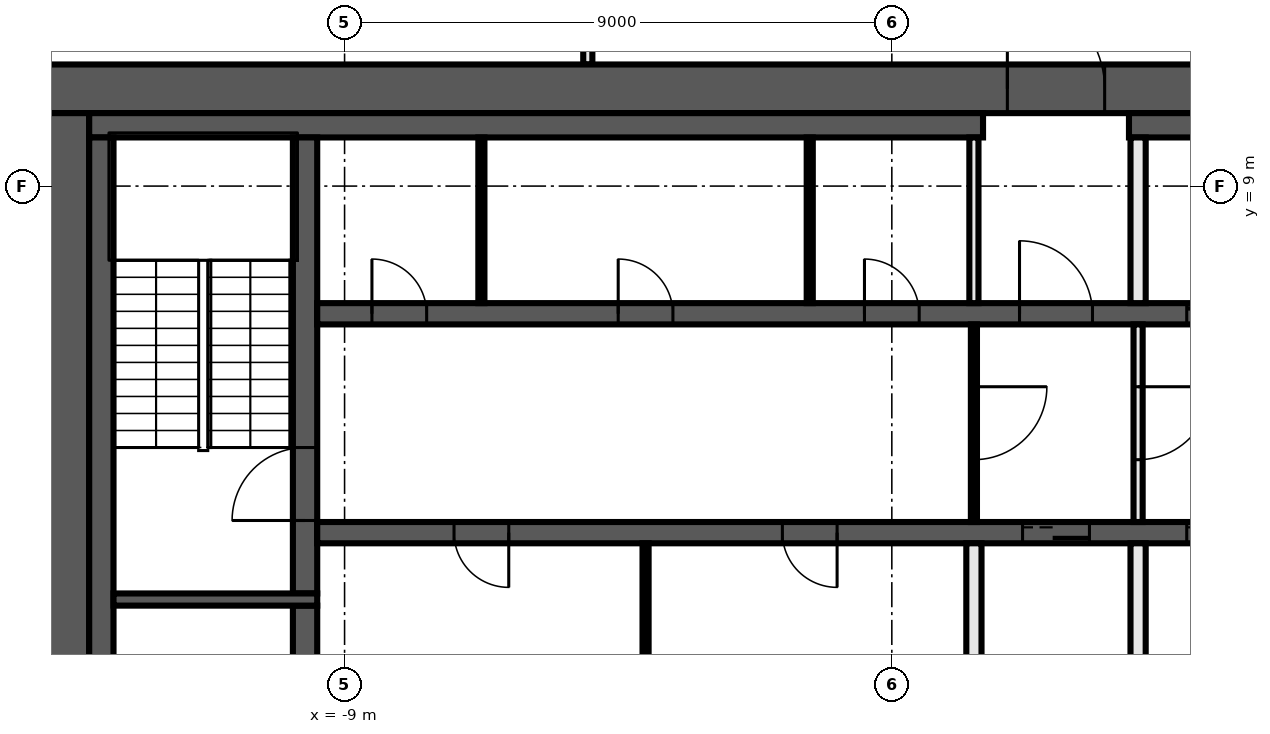
"""IFC4 building model, lengths in metres.
Left out: names, types, materials, properties, quantities, classifications, styles, units other than length and angle.
Written with IfcOpenShell. Run it as: python <this file> out.ifc"""

import sys

from ifc_helpers import new_model, si_unit, direction, frame, frame_2d, origin, place, context, subcontext, project, spatial, rectangle, extrude, element, fill, save


model = new_model("IFC4")
c1 = context("Model", 3, precision=1e-05, world=origin(), true_north=direction((0.0, 1.0)))
c2 = subcontext(c1, "Body", "Model", "MODEL_VIEW")
j1 = project(units=[si_unit("LENGTHUNIT", "METRE"), si_unit("PLANEANGLEUNIT", "RADIAN")], contexts=[c1])
p1 = place(None, origin())
s1 = spatial("IfcSite", under=j1, at=p1, CompositionType="ELEMENT")
p2 = place(p1, origin())
s2 = spatial("IfcBuilding", under=s1, at=p2, CompositionType="ELEMENT")
p3 = place(p2, frame((0.0, 0.0, 207.2)))
s3 = spatial("IfcBuildingStorey", under=s2, at=p3, CompositionType="ELEMENT", Elevation=207.2)
p4 = place(p3, frame((-5.0, 11.0, 0.0), z_axis=(0.0, 0.0, 1.0), x_axis=(0.0, 1.0, 0.0)))
e1 = element("IfcWall", 1, at=p4, inside=s3, PredefinedType="PARTITIONING", context=c2, shape_type="SweptSolid", body=[
    extrude(rectangle(XDim=3.125, YDim=0.15, at=frame_2d((1.562, 0.0))), origin(), (0.0, 0.0, 1.0), 3.82),
])
p5 = place(p3, frame((-14.0, 10.6, 0.0), z_axis=(0.0, 0.0, 1.0), x_axis=(1.0, 0.0, 0.0)))
e2 = element("IfcWall", 2, at=p5, inside=s3, PredefinedType="SHEAR", context=c2, shape_type="SweptSolid", body=[
    extrude(rectangle(XDim=28.0, YDim=0.8, at=frame_2d((14.0, 0.0))), origin(), (0.0, 0.0, 1.0), 3.82),
])
p6 = place(p5, frame((15.9, 0.0, 0.0)))
e3 = element("IfcOpeningElement", 3, at=p6, cuts=e2, PredefinedType="OPENING", context=c2, shape_type="SweptSolid", body=[
    extrude(rectangle(XDim=1.6, YDim=2.1, at=frame_2d((0.8, 1.05))), frame((0.0, 0.41, 0.0), z_axis=(0.0, -1.0, 0.0), x_axis=(1.0, 0.0, 0.0)), (0.0, 0.0, 1.0), 0.82),
])
p7 = place(p3, frame((-13.6, -10.2, 0.0), z_axis=(0.0, 0.0, 1.0), x_axis=(0.0, 1.0, 0.0)))
e4 = element("IfcWall", 4, at=p7, inside=s3, PredefinedType="SHEAR", context=c2, shape_type="SweptSolid", body=[
    extrude(rectangle(XDim=20.4, YDim=0.8, at=frame_2d((10.2, 0.0))), origin(), (0.0, 0.0, 1.0), 3.82),
])
p8 = place(p3, frame((-13.2, 10.0, 0.0), z_axis=(0.0, 0.0, 1.0), x_axis=(1.0, 0.0, 0.0)))
e5 = element("IfcWall", 5, at=p8, inside=s3, PredefinedType="SHEAR", context=c2, shape_type="SweptSolid", body=[
    extrude(rectangle(XDim=14.7, YDim=0.4, at=frame_2d((7.35, 0.0))), origin(), (0.0, 0.0, 1.0), 3.82),
])
p9 = place(p3, frame((3.9, 10.0, 0.0), z_axis=(0.0, 0.0, 1.0), x_axis=(1.0, 0.0, 0.0)))
e6 = element("IfcWall", 6, at=p9, inside=s3, PredefinedType="SHEAR", context=c2, shape_type="SweptSolid", body=[
    extrude(rectangle(XDim=9.3, YDim=0.4, at=frame_2d((4.65, 0.0))), origin(), (0.0, 0.0, 1.0), 3.82),
])
p10 = place(p3, frame((-13.0, -9.8, 0.0), z_axis=(0.0, 0.0, 1.0), x_axis=(0.0, 1.0, 0.0)))
e7 = element("IfcWall", 7, at=p10, inside=s3, PredefinedType="SHEAR", context=c2, shape_type="SweptSolid", body=[
    extrude(rectangle(XDim=19.6, YDim=0.4, at=frame_2d((9.8, 0.0))), origin(), (0.0, 0.0, 1.0), 3.82),
])
p11 = place(p3, frame((-9.65, -2.1, 0.0), z_axis=(0.0, 0.0, 1.0), x_axis=(0.0, 1.0, 0.0)))
e8 = element("IfcWall", 8, at=p11, inside=s3, PredefinedType="SHEAR", context=c2, shape_type="SweptSolid", body=[
    extrude(rectangle(XDim=4.2, YDim=0.4, at=frame_2d((2.1, 0.0))), origin(), (0.0, 0.0, 1.0), 3.82),
])
p12 = place(p3, frame((-9.65, 2.3, 0.0), z_axis=(0.0, 0.0, 1.0), x_axis=(0.0, 1.0, 0.0)))
e9 = element("IfcWall", 9, at=p12, inside=s3, PredefinedType="SHEAR", context=c2, shape_type="SweptSolid", body=[
    extrude(rectangle(XDim=7.5, YDim=0.4, at=frame_2d((3.75, 0.0))), origin(), (0.0, 0.0, 1.0), 3.82),
])
p13 = place(p12, frame((1.2, 0.0, 0.0)))
e10 = element("IfcOpeningElement", 10, at=p13, cuts=e9, PredefinedType="OPENING", context=c2, shape_type="SweptSolid", body=[
    extrude(rectangle(XDim=1.2, YDim=2.1, at=frame_2d((0.6, 1.05))), frame((0.0, 0.21, 0.0), z_axis=(0.0, -1.0, 0.0), x_axis=(1.0, 0.0, 0.0)), (0.0, 0.0, 1.0), 0.42),
])
p14 = place(p3, frame((-9.45, 2.2, 0.0), z_axis=(0.0, 0.0, 1.0), x_axis=(-1.0, 0.0, 0.0)))
e11 = element("IfcWall", 11, at=p14, inside=s3, PredefinedType="SHEAR", context=c2, shape_type="SweptSolid", body=[
    extrude(rectangle(XDim=3.35, YDim=0.2, at=frame_2d((1.675, 0.0))), origin(), (0.0, 0.0, 1.0), 3.82),
])
p15 = place(p3, frame((-9.45, 6.9, 0.0), z_axis=(0.0, 0.0, 1.0), x_axis=(1.0, 0.0, 0.0)))
e12 = element("IfcWall", 12, at=p15, inside=s3, PredefinedType="SHEAR", context=c2, shape_type="SweptSolid", body=[
    extrude(rectangle(XDim=18.9, YDim=0.35, at=frame_2d((9.45, 0.0))), origin(), (0.0, 0.0, 1.0), 3.82),
])
p16 = place(p15, frame((11.55, 0.0, 0.0)))
e13 = element("IfcOpeningElement", 13, at=p16, cuts=e12, PredefinedType="OPENING", context=c2, shape_type="SweptSolid", body=[
    extrude(rectangle(XDim=1.2, YDim=2.1, at=frame_2d((0.6, 1.05))), frame((0.0, 0.185, 0.0), z_axis=(0.0, -1.0, 0.0), x_axis=(1.0, 0.0, 0.0)), (0.0, 0.0, 1.0), 0.37),
])
p17 = place(p15, frame((14.3, 0.0, 0.0)))
e14 = element("IfcOpeningElement", 14, at=p17, cuts=e12, PredefinedType="OPENING", context=c2, shape_type="SweptSolid", body=[
    extrude(rectangle(XDim=1.1, YDim=2.1, at=frame_2d((0.55, 1.05))), frame((0.0, 0.185, 0.0), z_axis=(0.0, -1.0, 0.0), x_axis=(1.0, 0.0, 0.0)), (0.0, 0.0, 1.0), 0.37),
])
p18 = place(p15, frame((17.0, 0.0, 0.0)))
e15 = element("IfcOpeningElement", 15, at=p18, cuts=e12, PredefinedType="OPENING", context=c2, shape_type="SweptSolid", body=[
    extrude(rectangle(XDim=1.1, YDim=2.1, at=frame_2d((0.55, 1.05))), frame((0.0, 0.185, 0.0), z_axis=(0.0, -1.0, 0.0), x_axis=(1.0, 0.0, 0.0)), (0.0, 0.0, 1.0), 0.37),
])
p19 = place(p15, frame((0.9, 0.0, 0.0)))
e16 = element("IfcOpeningElement", 16, at=p19, cuts=e12, PredefinedType="OPENING", context=c2, shape_type="SweptSolid", body=[
    extrude(rectangle(XDim=0.9, YDim=2.1, at=frame_2d((0.45, 1.05))), frame((0.0, 0.185, 0.0), z_axis=(0.0, -1.0, 0.0), x_axis=(1.0, 0.0, 0.0)), (0.0, 0.0, 1.0), 0.37),
])
p20 = place(p15, frame((4.95, 0.0, 0.0)))
e17 = element("IfcOpeningElement", 17, at=p20, cuts=e12, PredefinedType="OPENING", context=c2, shape_type="SweptSolid", body=[
    extrude(rectangle(XDim=0.9, YDim=2.1, at=frame_2d((0.45, 1.05))), frame((0.0, 0.185, 0.0), z_axis=(0.0, -1.0, 0.0), x_axis=(1.0, 0.0, 0.0)), (0.0, 0.0, 1.0), 0.37),
])
p21 = place(p15, frame((9.0, 0.0, 0.0)))
e18 = element("IfcOpeningElement", 18, at=p21, cuts=e12, PredefinedType="OPENING", context=c2, shape_type="SweptSolid", body=[
    extrude(rectangle(XDim=0.9, YDim=2.1, at=frame_2d((0.45, 1.05))), frame((0.0, 0.185, 0.0), z_axis=(0.0, -1.0, 0.0), x_axis=(1.0, 0.0, 0.0)), (0.0, 0.0, 1.0), 0.37),
])
p22 = place(p3, frame((9.45, 3.3, 0.0), z_axis=(0.0, 0.0, 1.0), x_axis=(-1.0, 0.0, 0.0)))
e19 = element("IfcWall", 19, at=p22, inside=s3, PredefinedType="SHEAR", context=c2, shape_type="SweptSolid", body=[
    extrude(rectangle(XDim=18.9, YDim=0.35, at=frame_2d((9.45, 0.0))), origin(), (0.0, 0.0, 1.0), 3.82),
])
p23 = place(p22, frame((6.2, 0.0, 0.0)))
e20 = element("IfcOpeningElement", 20, at=p23, cuts=e19, PredefinedType="OPENING", context=c2, shape_type="SweptSolid", body=[
    extrude(rectangle(XDim=1.1, YDim=2.1, at=frame_2d((0.55, 1.05))), frame((0.0, 0.185, 0.0), z_axis=(0.0, -1.0, 0.0), x_axis=(1.0, 0.0, 0.0)), (0.0, 0.0, 1.0), 0.37),
])
p24 = place(p22, frame((3.5, 0.0, 0.0)))
e21 = element("IfcOpeningElement", 21, at=p24, cuts=e19, PredefinedType="OPENING", context=c2, shape_type="SweptSolid", body=[
    extrude(rectangle(XDim=1.1, YDim=2.1, at=frame_2d((0.55, 1.05))), frame((0.0, 0.185, 0.0), z_axis=(0.0, -1.0, 0.0), x_axis=(1.0, 0.0, 0.0)), (0.0, 0.0, 1.0), 0.37),
])
p25 = place(p22, frame((0.9, 0.0, 0.0)))
e22 = element("IfcOpeningElement", 22, at=p25, cuts=e19, PredefinedType="OPENING", context=c2, shape_type="SweptSolid", body=[
    extrude(rectangle(XDim=0.9, YDim=2.1, at=frame_2d((0.45, 1.05))), frame((0.0, 0.185, 0.0), z_axis=(0.0, -1.0, 0.0), x_axis=(1.0, 0.0, 0.0)), (0.0, 0.0, 1.0), 0.37),
])
p26 = place(p22, frame((15.75, 0.0, 0.0)))
e23 = element("IfcOpeningElement", 23, at=p26, cuts=e19, PredefinedType="OPENING", context=c2, shape_type="SweptSolid", body=[
    extrude(rectangle(XDim=0.9, YDim=2.1, at=frame_2d((0.45, 1.05))), frame((0.0, 0.185, 0.0), z_axis=(0.0, -1.0, 0.0), x_axis=(1.0, 0.0, 0.0)), (0.0, 0.0, 1.0), 0.37),
])
p27 = place(p22, frame((10.35, 0.0, 0.0)))
e24 = element("IfcOpeningElement", 24, at=p27, cuts=e19, PredefinedType="OPENING", context=c2, shape_type="SweptSolid", body=[
    extrude(rectangle(XDim=0.9, YDim=2.1, at=frame_2d((0.45, 1.05))), frame((0.0, 0.185, 0.0), z_axis=(0.0, -1.0, 0.0), x_axis=(1.0, 0.0, 0.0)), (0.0, 0.0, 1.0), 0.37),
])
p28 = place(p3, frame((4.05, 6.725, 0.0), z_axis=(0.0, 0.0, 1.0), x_axis=(0.0, -1.0, 0.0)))
e25 = element("IfcWall", 25, at=p28, inside=s3, PredefinedType="PARTITIONING", context=c2, shape_type="SweptSolid", body=[
    extrude(rectangle(XDim=3.25, YDim=0.15, at=frame_2d((1.625, 0.0))), origin(), (0.0, 0.0, 1.0), 3.82),
])
p29 = place(p28, frame((1.025, 0.0, 0.0)))
e26 = element("IfcOpeningElement", 26, at=p29, cuts=e25, PredefinedType="OPENING", context=c2, shape_type="SweptSolid", body=[
    extrude(rectangle(XDim=1.2, YDim=2.1, at=frame_2d((0.6, 1.05))), frame((0.0, 0.085, 0.0), z_axis=(0.0, -1.0, 0.0), x_axis=(1.0, 0.0, 0.0)), (0.0, 0.0, 1.0), 0.17),
])
for number, where, z_axis, x_axis in (
    (27, (4.05, 0.4, 0.0), (0.0, 0.0, 1.0), (0.0, 1.0, 0.0)),
    (28, (4.05, 7.075, 0.0), (0.0, 0.0, 1.0), (0.0, 1.0, 0.0)),
):
    element("IfcWall", number, at=place(p3, frame(where, z_axis=z_axis, x_axis=x_axis)), inside=s3, PredefinedType="SOLIDWALL", context=c2, shape_type="SweptSolid", body=[
        extrude(rectangle(XDim=2.725, YDim=0.25, at=frame_2d((1.363, 0.0))), origin(), (0.0, 0.0, 1.0), 3.82),
    ])
p30 = place(p3, frame((1.35, 7.075, 0.0), z_axis=(0.0, 0.0, 1.0), x_axis=(0.0, 1.0, 0.0)))
e29 = element("IfcWall", 29, at=p30, inside=s3, PredefinedType="PARTITIONING", context=c2, shape_type="SweptSolid", body=[
    extrude(rectangle(XDim=2.725, YDim=0.15, at=frame_2d((1.363, 0.0))), origin(), (0.0, 0.0, 1.0), 3.82),
])
p31 = place(p3, frame((1.35, 6.725, 0.0), z_axis=(0.0, 0.0, 1.0), x_axis=(0.0, -1.0, 0.0)))
e30 = element("IfcWall", 30, at=p31, inside=s3, PredefinedType="PARTITIONING", context=c2, shape_type="SweptSolid", body=[
    extrude(rectangle(XDim=3.25, YDim=0.1, at=frame_2d((1.625, 0.0))), origin(), (0.0, 0.0, 1.0), 3.82),
])
p32 = place(p31, frame((1.025, 0.0, 0.0)))
e31 = element("IfcOpeningElement", 31, at=p32, cuts=e30, PredefinedType="OPENING", context=c2, shape_type="SweptSolid", body=[
    extrude(rectangle(XDim=1.2, YDim=2.1, at=frame_2d((0.6, 1.05))), frame((0.0, 0.06, 0.0), z_axis=(0.0, -1.0, 0.0), x_axis=(1.0, 0.0, 0.0)), (0.0, 0.0, 1.0), 0.12),
])
p33 = place(p3, frame((1.35, 0.4, 0.0), z_axis=(0.0, 0.0, 1.0), x_axis=(0.0, 1.0, 0.0)))
e32 = element("IfcWall", 32, at=p33, inside=s3, PredefinedType="SOLIDWALL", context=c2, shape_type="SweptSolid", body=[
    extrude(rectangle(XDim=2.725, YDim=0.25, at=frame_2d((1.363, 0.0))), origin(), (0.0, 0.0, 1.0), 3.82),
])
for number, where, z_axis, x_axis in (
    (33, (-1.35, 7.075, 0.0), (0.0, 0.0, 1.0), (0.0, 1.0, 0.0)),
    (34, (-4.05, 0.4, 0.0), (0.0, 0.0, 1.0), (0.0, 1.0, 0.0)),
    (35, (-6.75, 7.075, 0.0), (0.0, 0.0, 1.0), (0.0, 1.0, 0.0)),
):
    element("IfcWall", number, at=place(p3, frame(where, z_axis=z_axis, x_axis=x_axis)), inside=s3, PredefinedType="PARTITIONING", context=c2, shape_type="SweptSolid", body=[
        extrude(rectangle(XDim=2.725, YDim=0.1, at=frame_2d((1.363, 0.0))), origin(), (0.0, 0.0, 1.0), 3.82),
    ])
p34 = place(p6, origin())
e36 = element("IfcDoor", 36, at=p34, inside=s3, OperationType="DOUBLE_DOOR_SINGLE_SWING", PredefinedType="DOOR", context=c2, shape_type="SweptSolid", body=[
    extrude(rectangle(XDim=1.6, YDim=2.1, at=frame_2d((0.8, 1.05))), frame((0.0, 0.025, 0.0), z_axis=(0.0, -1.0, 0.0), x_axis=(1.0, 0.0, 0.0)), (0.0, 0.0, 1.0), 0.05),
])
fill(e3, e36)
p35 = place(p16, origin())
e37 = element("IfcDoor", 37, at=p35, inside=s3, OperationType="SINGLE_SWING_LEFT", PredefinedType="DOOR", context=c2, shape_type="SweptSolid", body=[
    extrude(rectangle(XDim=1.2, YDim=2.1, at=frame_2d((0.6, 1.05))), frame((0.0, 0.025, 0.0), z_axis=(0.0, -1.0, 0.0), x_axis=(1.0, 0.0, 0.0)), (0.0, 0.0, 1.0), 0.05),
])
fill(e13, e37)
p36 = place(p17, origin())
e38 = element("IfcDoor", 38, at=p36, inside=s3, OperationType="DOUBLE_DOOR_SLIDING", PredefinedType="DOOR", context=c2, shape_type="SweptSolid", body=[
    extrude(rectangle(XDim=1.1, YDim=2.1, at=frame_2d((0.55, 1.05))), frame((0.0, 0.025, 0.0), z_axis=(0.0, -1.0, 0.0), x_axis=(1.0, 0.0, 0.0)), (0.0, 0.0, 1.0), 0.05),
])
fill(e14, e38)
p37 = place(p23, origin())
e39 = element("IfcDoor", 39, at=p37, inside=s3, OperationType="DOUBLE_DOOR_SLIDING", PredefinedType="DOOR", context=c2, shape_type="SweptSolid", body=[
    extrude(rectangle(XDim=1.1, YDim=2.1, at=frame_2d((0.55, 1.05))), frame((0.0, 0.025, 0.0), z_axis=(0.0, -1.0, 0.0), x_axis=(1.0, 0.0, 0.0)), (0.0, 0.0, 1.0), 0.05),
])
fill(e20, e39)
p38 = place(p24, origin())
e40 = element("IfcDoor", 40, at=p38, inside=s3, OperationType="DOUBLE_DOOR_SLIDING", PredefinedType="DOOR", context=c2, shape_type="SweptSolid", body=[
    extrude(rectangle(XDim=1.1, YDim=2.1, at=frame_2d((0.55, 1.05))), frame((0.0, 0.025, 0.0), z_axis=(0.0, -1.0, 0.0), x_axis=(1.0, 0.0, 0.0)), (0.0, 0.0, 1.0), 0.05),
])
fill(e21, e40)
p39 = place(p19, origin())
e41 = element("IfcDoor", 41, at=p39, inside=s3, OperationType="SINGLE_SWING_RIGHT", PredefinedType="DOOR", context=c2, shape_type="SweptSolid", body=[
    extrude(rectangle(XDim=0.9, YDim=2.1, at=frame_2d((0.45, 1.05))), frame((0.0, 0.025, 0.0), z_axis=(0.0, -1.0, 0.0), x_axis=(1.0, 0.0, 0.0)), (0.0, 0.0, 1.0), 0.05),
])
fill(e16, e41)
p40 = place(p20, origin())
e42 = element("IfcDoor", 42, at=p40, inside=s3, OperationType="SINGLE_SWING_LEFT", PredefinedType="DOOR", context=c2, shape_type="SweptSolid", body=[
    extrude(rectangle(XDim=0.9, YDim=2.1, at=frame_2d((0.45, 1.05))), frame((0.0, 0.025, 0.0), z_axis=(0.0, -1.0, 0.0), x_axis=(1.0, 0.0, 0.0)), (0.0, 0.0, 1.0), 0.05),
])
fill(e17, e42)
p41 = place(p21, origin())
e43 = element("IfcDoor", 43, at=p41, inside=s3, OperationType="SINGLE_SWING_RIGHT", PredefinedType="DOOR", context=c2, shape_type="SweptSolid", body=[
    extrude(rectangle(XDim=0.9, YDim=2.1, at=frame_2d((0.45, 1.05))), frame((0.0, 0.025, 0.0), z_axis=(0.0, -1.0, 0.0), x_axis=(1.0, 0.0, 0.0)), (0.0, 0.0, 1.0), 0.05),
])
fill(e18, e43)
p42 = place(p26, origin())
e44 = element("IfcDoor", 44, at=p42, inside=s3, OperationType="SINGLE_SWING_LEFT", PredefinedType="DOOR", context=c2, shape_type="SweptSolid", body=[
    extrude(rectangle(XDim=0.9, YDim=2.1, at=frame_2d((0.45, 1.05))), frame((0.0, 0.025, 0.0), z_axis=(0.0, -1.0, 0.0), x_axis=(1.0, 0.0, 0.0)), (0.0, 0.0, 1.0), 0.05),
])
fill(e23, e44)
p43 = place(p27, origin())
e45 = element("IfcDoor", 45, at=p43, inside=s3, OperationType="SINGLE_SWING_RIGHT", PredefinedType="DOOR", context=c2, shape_type="SweptSolid", body=[
    extrude(rectangle(XDim=0.9, YDim=2.1, at=frame_2d((0.45, 1.05))), frame((0.0, 0.025, 0.0), z_axis=(0.0, -1.0, 0.0), x_axis=(1.0, 0.0, 0.0)), (0.0, 0.0, 1.0), 0.05),
])
fill(e24, e45)
p44 = place(p13, origin())
e46 = element("IfcDoor", 46, at=p44, inside=s3, OperationType="SINGLE_SWING_RIGHT", PredefinedType="DOOR", context=c2, shape_type="SweptSolid", body=[
    extrude(rectangle(XDim=1.2, YDim=2.1, at=frame_2d((0.6, 1.05))), frame((0.0, 0.025, 0.0), z_axis=(0.0, -1.0, 0.0), x_axis=(1.0, 0.0, 0.0)), (0.0, 0.0, 1.0), 0.05),
])
fill(e10, e46)
p45 = place(p32, origin())
e47 = element("IfcDoor", 47, at=p45, inside=s3, OperationType="SINGLE_SWING_LEFT", PredefinedType="DOOR", context=c2, shape_type="SweptSolid", body=[
    extrude(rectangle(XDim=1.2, YDim=2.1, at=frame_2d((0.6, 1.05))), frame((0.0, 0.025, 0.0), z_axis=(0.0, -1.0, 0.0), x_axis=(1.0, 0.0, 0.0)), (0.0, 0.0, 1.0), 0.05),
])
fill(e31, e47)
p46 = place(p29, origin())
e48 = element("IfcDoor", 48, at=p46, inside=s3, OperationType="SINGLE_SWING_RIGHT", PredefinedType="DOOR", context=c2, shape_type="SweptSolid", body=[
    extrude(rectangle(XDim=1.2, YDim=2.1, at=frame_2d((0.6, 1.05))), frame((0.0, 0.025, 0.0), z_axis=(0.0, -1.0, 0.0), x_axis=(1.0, 0.0, 0.0)), (0.0, 0.0, 1.0), 0.05),
])
fill(e26, e48)
save(model, sys.argv[1])
